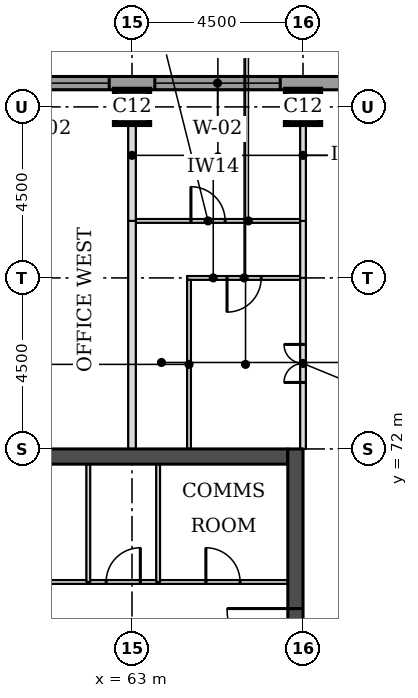
"""IFC4 building model, lengths in metres.
Left out: names, types, materials, properties, quantities, classifications, styles, units other than length and angle.
Written with IfcOpenShell. Run it as: python <this file> out.ifc"""

import sys

from ifc_helpers import new_model, si_unit, direction, frame, frame_2d, origin, origin_2d, place, context, subcontext, project, spatial, rectangle, extrude, element, fill, save


model = new_model("IFC4")
c1 = context("Model", 3, precision=1e-05, world=origin(), true_north=direction((0.0, 1.0)))
c2 = subcontext(c1, "Body", "Model", "MODEL_VIEW")
j1 = project(units=[si_unit("LENGTHUNIT", "METRE"), si_unit("PLANEANGLEUNIT", "RADIAN")], contexts=[c1])
p1 = place(None, origin())
s1 = spatial("IfcSite", under=j1, at=p1, CompositionType="ELEMENT")
p2 = place(p1, origin())
s2 = spatial("IfcBuilding", under=s1, at=p2, CompositionType="ELEMENT")
p3 = place(p2, frame((0.0, 0.0, 166.2)))
s3 = spatial("IfcBuildingStorey", under=s2, at=p3, CompositionType="ELEMENT", Elevation=166.2)
for number, where, z_axis, x_axis in (
    (1, (63.0, 81.0, 0.0), (0.0, 0.0, 1.0), (1.0, 0.0, 0.0)),
    (2, (67.5, 81.0, 0.0), (0.0, 0.0, 1.0), (1.0, 0.0, 0.0)),
):
    element("IfcColumn", number, at=place(p3, frame(where, z_axis=z_axis, x_axis=x_axis)), inside=s3, PredefinedType="COLUMN", context=c2, shape_type="SweptSolid", body=[
        extrude(rectangle(XDim=0.9, YDim=0.9, at=origin_2d()), origin(), (0.0, 0.0, 1.0), 3.7),
    ])
p4 = place(p3, frame((45.4, 71.8, 0.0), z_axis=(0.0, 0.0, 1.0), x_axis=(1.0, 0.0, 0.0)))
e3 = element("IfcWall", 3, at=p4, inside=s3, PredefinedType="SHEAR", context=c2, shape_type="SweptSolid", body=[
    extrude(rectangle(XDim=21.7, YDim=0.4, at=frame_2d((10.85, 0.0))), origin(), (0.0, 0.0, 1.0), 3.7),
])
p5 = place(p3, frame((67.3, 49.5, 0.0), z_axis=(0.0, 0.0, 1.0), x_axis=(0.0, 1.0, 0.0)))
e4 = element("IfcWall", 4, at=p5, inside=s3, PredefinedType="SHEAR", context=c2, shape_type="SweptSolid", body=[
    extrude(rectangle(XDim=22.5, YDim=0.4, at=frame_2d((11.25, 0.0))), origin(), (0.0, 0.0, 1.0), 3.7),
])
p6 = place(p5, frame((4.2, 0.0, 0.0)))
e5 = element("IfcOpeningElement", 5, at=p6, cuts=e4, PredefinedType="OPENING", context=c2, shape_type="SweptSolid", body=[
    extrude(rectangle(XDim=1.8, YDim=2.1, at=frame_2d((0.9, 1.05))), frame((0.0, 0.21, 0.0), z_axis=(0.0, -1.0, 0.0), x_axis=(1.0, 0.0, 0.0)), (0.0, 0.0, 1.0), 0.42),
])
p7 = place(p5, frame((6.9, 0.0, 0.0)))
e6 = element("IfcOpeningElement", 6, at=p7, cuts=e4, PredefinedType="OPENING", context=c2, shape_type="SweptSolid", body=[
    extrude(rectangle(XDim=1.1, YDim=2.1, at=frame_2d((0.55, 1.05))), frame((0.0, 0.21, 0.0), z_axis=(0.0, -1.0, 0.0), x_axis=(1.0, 0.0, 0.0)), (0.0, 0.0, 1.0), 0.42),
])
p8 = place(p5, frame((13.6, 0.0, 0.0)))
e7 = element("IfcOpeningElement", 7, at=p8, cuts=e4, PredefinedType="OPENING", context=c2, shape_type="SweptSolid", body=[
    extrude(rectangle(XDim=1.1, YDim=2.1, at=frame_2d((0.55, 1.05))), frame((0.0, 0.21, 0.0), z_axis=(0.0, -1.0, 0.0), x_axis=(1.0, 0.0, 0.0)), (0.0, 0.0, 1.0), 0.42),
])
p9 = place(p5, frame((16.5, 0.0, 0.0)))
e8 = element("IfcOpeningElement", 8, at=p9, cuts=e4, PredefinedType="OPENING", context=c2, shape_type="SweptSolid", body=[
    extrude(rectangle(XDim=1.8, YDim=2.1, at=frame_2d((0.9, 1.05))), frame((0.0, 0.21, 0.0), z_axis=(0.0, -1.0, 0.0), x_axis=(1.0, 0.0, 0.0)), (0.0, 0.0, 1.0), 0.42),
])
p10 = place(p3, frame((72.331, 81.625, 0.0), z_axis=(0.0, 0.0, 1.0), x_axis=(-1.0, 0.0, 0.0)))
e9 = element("IfcWall", 9, at=p10, inside=s3, PredefinedType="STANDARD", context=c2, shape_type="SweptSolid", body=[
    extrude(rectangle(XDim=32.163, YDim=0.35, at=frame_2d((16.081, 0.0))), origin(), (0.0, 0.0, 1.0), 3.525),
])
p11 = place(p10, frame((5.431, 0.0, 0.9)))
e10 = element("IfcOpeningElement", 10, at=p11, cuts=e9, PredefinedType="OPENING", context=c2, shape_type="SweptSolid", body=[
    extrude(rectangle(XDim=3.3, YDim=1.9, at=frame_2d((1.65, 0.95))), frame((0.0, 0.185, 0.0), z_axis=(0.0, -1.0, 0.0), x_axis=(1.0, 0.0, 0.0)), (0.0, 0.0, 1.0), 0.37),
])
p12 = place(p10, frame((9.931, 0.0, 0.9)))
e11 = element("IfcOpeningElement", 11, at=p12, cuts=e9, PredefinedType="OPENING", context=c2, shape_type="SweptSolid", body=[
    extrude(rectangle(XDim=3.3, YDim=1.9, at=frame_2d((1.65, 0.95))), frame((0.0, 0.185, 0.0), z_axis=(0.0, -1.0, 0.0), x_axis=(1.0, 0.0, 0.0)), (0.0, 0.0, 1.0), 0.37),
])
p13 = place(p10, frame((14.431, 0.0, 0.9)))
e12 = element("IfcOpeningElement", 12, at=p13, cuts=e9, PredefinedType="OPENING", context=c2, shape_type="SweptSolid", body=[
    extrude(rectangle(XDim=3.3, YDim=1.9, at=frame_2d((1.65, 0.95))), frame((0.0, 0.185, 0.0), z_axis=(0.0, -1.0, 0.0), x_axis=(1.0, 0.0, 0.0)), (0.0, 0.0, 1.0), 0.37),
])
p14 = place(p10, frame((18.931, 0.0, 0.9)))
e13 = element("IfcOpeningElement", 13, at=p14, cuts=e9, PredefinedType="OPENING", context=c2, shape_type="SweptSolid", body=[
    extrude(rectangle(XDim=3.3, YDim=1.9, at=frame_2d((1.65, 0.95))), frame((0.0, 0.185, 0.0), z_axis=(0.0, -1.0, 0.0), x_axis=(1.0, 0.0, 0.0)), (0.0, 0.0, 1.0), 0.37),
])
p15 = place(p10, frame((23.431, 0.0, 0.9)))
e14 = element("IfcOpeningElement", 14, at=p15, cuts=e9, PredefinedType="OPENING", context=c2, shape_type="SweptSolid", body=[
    extrude(rectangle(XDim=3.3, YDim=1.9, at=frame_2d((1.65, 0.95))), frame((0.0, 0.185, 0.0), z_axis=(0.0, -1.0, 0.0), x_axis=(1.0, 0.0, 0.0)), (0.0, 0.0, 1.0), 0.37),
])
p16 = place(p3, frame((64.45, 76.5, 0.0), z_axis=(0.0, 0.0, 1.0), x_axis=(1.0, 0.0, 0.0)))
e15 = element("IfcWall", 15, at=p16, inside=s3, PredefinedType="PARTITIONING", context=c2, shape_type="SweptSolid", body=[
    extrude(rectangle(XDim=2.975, YDim=0.1, at=frame_2d((1.488, 0.0))), origin(), (0.0, 0.0, 1.0), 3.55),
])
p17 = place(p16, frame((1.05, 0.0, 0.0)))
e16 = element("IfcOpeningElement", 16, at=p17, cuts=e15, PredefinedType="OPENING", context=c2, shape_type="SweptSolid", body=[
    extrude(rectangle(XDim=0.9, YDim=2.1, at=frame_2d((0.45, 1.05))), frame((0.0, 0.06, 0.0), z_axis=(0.0, -1.0, 0.0), x_axis=(1.0, 0.0, 0.0)), (0.0, 0.0, 1.0), 0.12),
])
p18 = place(p3, frame((63.1, 78.0, 0.0), z_axis=(0.0, 0.0, 1.0), x_axis=(1.0, 0.0, 0.0)))
e17 = element("IfcWall", 17, at=p18, inside=s3, PredefinedType="PARTITIONING", context=c2, shape_type="SweptSolid", body=[
    extrude(rectangle(XDim=4.325, YDim=0.1, at=frame_2d((2.163, 0.0))), origin(), (0.0, 0.0, 1.0), 3.55),
])
p19 = place(p18, frame((1.45, 0.0, 0.0)))
e18 = element("IfcOpeningElement", 18, at=p19, cuts=e17, PredefinedType="OPENING", context=c2, shape_type="SweptSolid", body=[
    extrude(rectangle(XDim=0.9, YDim=2.1, at=frame_2d((0.45, 1.05))), frame((0.0, 0.06, 0.0), z_axis=(0.0, -1.0, 0.0), x_axis=(1.0, 0.0, 0.0)), (0.0, 0.0, 1.0), 0.12),
])
p20 = place(p3, frame((63.0, 72.0, 0.0), z_axis=(0.0, 0.0, 1.0), x_axis=(0.0, 1.0, 0.0)))
e19 = element("IfcWall", 19, at=p20, inside=s3, PredefinedType="PARTITIONING", context=c2, shape_type="SweptSolid", body=[
    extrude(rectangle(XDim=6.0, YDim=0.2, at=frame_2d((3.0, 0.0))), origin(), (0.0, 0.0, 1.0), 3.55),
])
p21 = place(p3, frame((64.5, 72.0, 0.0), z_axis=(0.0, 0.0, 1.0), x_axis=(0.0, 1.0, 0.0)))
e20 = element("IfcWall", 20, at=p21, inside=s3, PredefinedType="PARTITIONING", context=c2, shape_type="SweptSolid", body=[
    extrude(rectangle(XDim=4.45, YDim=0.1, at=frame_2d((2.225, 0.0))), origin(), (0.0, 0.0, 1.0), 3.55),
])
p22 = place(p3, frame((67.5, 72.0, 0.0), z_axis=(0.0, 0.0, 1.0), x_axis=(0.0, 1.0, 0.0)))
e21 = element("IfcWall", 21, at=p22, inside=s3, PredefinedType="PARTITIONING", context=c2, shape_type="SweptSolid", body=[
    extrude(rectangle(XDim=4.5, YDim=0.15, at=frame_2d((2.25, 0.0))), origin(), (0.0, 0.0, 1.0), 3.022),
])
p23 = place(p22, frame((1.75, 0.0, 0.0)))
e22 = element("IfcOpeningElement", 22, at=p23, cuts=e21, PredefinedType="OPENING", context=c2, shape_type="SweptSolid", body=[
    extrude(rectangle(XDim=1.0, YDim=2.1, at=frame_2d((0.5, 1.05))), frame((0.0, 0.085, 0.0), z_axis=(0.0, -1.0, 0.0), x_axis=(1.0, 0.0, 0.0)), (0.0, 0.0, 1.0), 0.17),
])
p24 = place(p3, frame((67.5, 76.5, 0.0), z_axis=(0.0, 0.0, 1.0), x_axis=(0.0, 1.0, 0.0)))
e23 = element("IfcWall", 23, at=p24, inside=s3, PredefinedType="PARTITIONING", context=c2, shape_type="SweptSolid", body=[
    extrude(rectangle(XDim=1.5, YDim=0.15, at=frame_2d((0.75, 0.0))), origin(), (0.0, 0.0, 1.0), 3.022),
])
p25 = place(p3, frame((63.0, 78.0, 0.0), z_axis=(0.0, 0.0, 1.0), x_axis=(0.0, 1.0, 0.0)))
e24 = element("IfcWall", 24, at=p25, inside=s3, PredefinedType="PARTITIONING", context=c2, shape_type="SweptSolid", body=[
    extrude(rectangle(XDim=3.45, YDim=0.2, at=frame_2d((1.725, 0.0))), origin(), (0.0, 0.0, 1.0), 3.55),
])
p26 = place(p3, frame((67.5, 78.0, 0.0), z_axis=(0.0, 0.0, 1.0), x_axis=(0.0, 1.0, 0.0)))
e25 = element("IfcWall", 25, at=p26, inside=s3, PredefinedType="PARTITIONING", context=c2, shape_type="SweptSolid", body=[
    extrude(rectangle(XDim=3.45, YDim=0.15, at=frame_2d((1.725, 0.0))), origin(), (0.0, 0.0, 1.0), 3.022),
])
p27 = place(p3, frame((45.4, 68.5, 0.0), z_axis=(0.0, 0.0, 1.0), x_axis=(1.0, 0.0, 0.0)))
e26 = element("IfcWall", 26, at=p27, inside=s3, PredefinedType="PARTITIONING", context=c2, shape_type="SweptSolid", body=[
    extrude(rectangle(XDim=21.7, YDim=0.1, at=frame_2d((10.85, 0.0))), origin(), (0.0, 0.0, 1.0), 3.55),
])
p28 = place(p27, frame((19.544, 0.0, 0.0)))
e27 = element("IfcOpeningElement", 27, at=p28, cuts=e26, PredefinedType="OPENING", context=c2, shape_type="SweptSolid", body=[
    extrude(rectangle(XDim=0.9, YDim=2.1, at=frame_2d((0.45, 1.05))), frame((0.0, 0.06, 0.0), z_axis=(0.0, -1.0, 0.0), x_axis=(1.0, 0.0, 0.0)), (0.0, 0.0, 1.0), 0.12),
])
p29 = place(p27, frame((16.919, 0.0, 0.0)))
e28 = element("IfcOpeningElement", 28, at=p29, cuts=e26, PredefinedType="OPENING", context=c2, shape_type="SweptSolid", body=[
    extrude(rectangle(XDim=0.9, YDim=2.1, at=frame_2d((0.45, 1.05))), frame((0.0, 0.06, 0.0), z_axis=(0.0, -1.0, 0.0), x_axis=(1.0, 0.0, 0.0)), (0.0, 0.0, 1.0), 0.12),
])
p30 = place(p27, frame((0.6, 0.0, 0.0)))
e29 = element("IfcOpeningElement", 29, at=p30, cuts=e26, PredefinedType="OPENING", context=c2, shape_type="SweptSolid", body=[
    extrude(rectangle(XDim=0.9, YDim=2.1, at=frame_2d((0.45, 1.05))), frame((0.0, 0.06, 0.0), z_axis=(0.0, -1.0, 0.0), x_axis=(1.0, 0.0, 0.0)), (0.0, 0.0, 1.0), 0.12),
])
p31 = place(p27, frame((3.225, 0.0, 0.0)))
e30 = element("IfcOpeningElement", 30, at=p31, cuts=e26, PredefinedType="OPENING", context=c2, shape_type="SweptSolid", body=[
    extrude(rectangle(XDim=0.9, YDim=2.1, at=frame_2d((0.45, 1.05))), frame((0.0, 0.06, 0.0), z_axis=(0.0, -1.0, 0.0), x_axis=(1.0, 0.0, 0.0)), (0.0, 0.0, 1.0), 0.12),
])
p32 = place(p27, frame((14.208, 0.0, 0.0)))
e31 = element("IfcOpeningElement", 31, at=p32, cuts=e26, PredefinedType="OPENING", context=c2, shape_type="SweptSolid", body=[
    extrude(rectangle(XDim=0.9, YDim=2.1, at=frame_2d((0.45, 1.05))), frame((0.0, 0.06, 0.0), z_axis=(0.0, -1.0, 0.0), x_axis=(1.0, 0.0, 0.0)), (0.0, 0.0, 1.0), 0.12),
])
p33 = place(p27, frame((10.96, 0.0, 0.0)))
e32 = element("IfcOpeningElement", 32, at=p33, cuts=e26, PredefinedType="OPENING", context=c2, shape_type="SweptSolid", body=[
    extrude(rectangle(XDim=0.9, YDim=2.1, at=frame_2d((0.45, 1.05))), frame((0.0, 0.06, 0.0), z_axis=(0.0, -1.0, 0.0), x_axis=(1.0, 0.0, 0.0)), (0.0, 0.0, 1.0), 0.12),
])
p34 = place(p27, frame((8.272, 0.0, 0.0)))
e33 = element("IfcOpeningElement", 33, at=p34, cuts=e26, PredefinedType="OPENING", context=c2, shape_type="SweptSolid", body=[
    extrude(rectangle(XDim=0.9, YDim=2.1, at=frame_2d((0.45, 1.05))), frame((0.0, 0.06, 0.0), z_axis=(0.0, -1.0, 0.0), x_axis=(1.0, 0.0, 0.0)), (0.0, 0.0, 1.0), 0.12),
])
p35 = place(p27, frame((5.92, 0.0, 0.0)))
e34 = element("IfcOpeningElement", 34, at=p35, cuts=e26, PredefinedType="OPENING", context=c2, shape_type="SweptSolid", body=[
    extrude(rectangle(XDim=0.9, YDim=2.1, at=frame_2d((0.45, 1.05))), frame((0.0, 0.06, 0.0), z_axis=(0.0, -1.0, 0.0), x_axis=(1.0, 0.0, 0.0)), (0.0, 0.0, 1.0), 0.12),
])
for number, where, z_axis, x_axis in (
    (35, (61.85, 68.5, 0.0), (0.0, 0.0, 1.0), (0.0, 1.0, 0.0)),
    (36, (63.688, 68.5, 0.0), (0.0, 0.0, 1.0), (0.0, 1.0, 0.0)),
):
    element("IfcWall", number, at=place(p3, frame(where, z_axis=z_axis, x_axis=x_axis)), inside=s3, PredefinedType="PARTITIONING", context=c2, shape_type="SweptSolid", body=[
        extrude(rectangle(XDim=3.1, YDim=0.1, at=frame_2d((1.55, 0.0))), origin(), (0.0, 0.0, 1.0), 3.55),
    ])
p36 = place(p11, origin())
e37 = element("IfcWindow", 37, at=p36, inside=s3, PartitioningType="SINGLE_PANEL", PredefinedType="WINDOW", context=c2, shape_type="SweptSolid", body=[
    extrude(rectangle(XDim=3.3, YDim=1.9, at=frame_2d((1.65, 0.95))), frame((0.0, 0.085, 0.0), z_axis=(0.0, -1.0, 0.0), x_axis=(1.0, 0.0, 0.0)), (0.0, 0.0, 1.0), 0.06),
])
fill(e10, e37)
p37 = place(p12, origin())
e38 = element("IfcWindow", 38, at=p37, inside=s3, PartitioningType="SINGLE_PANEL", PredefinedType="WINDOW", context=c2, shape_type="SweptSolid", body=[
    extrude(rectangle(XDim=3.3, YDim=1.9, at=frame_2d((1.65, 0.95))), frame((0.0, 0.085, 0.0), z_axis=(0.0, -1.0, 0.0), x_axis=(1.0, 0.0, 0.0)), (0.0, 0.0, 1.0), 0.06),
])
fill(e11, e38)
p38 = place(p23, origin())
e39 = element("IfcDoor", 39, at=p38, inside=s3, OperationType="DOUBLE_DOOR_SINGLE_SWING", PredefinedType="DOOR", context=c2, shape_type="SweptSolid", body=[
    extrude(rectangle(XDim=1.0, YDim=2.1, at=frame_2d((0.5, 1.05))), frame((0.0, 0.025, 0.0), z_axis=(0.0, -1.0, 0.0), x_axis=(1.0, 0.0, 0.0)), (0.0, 0.0, 1.0), 0.05),
])
fill(e22, e39)
p39 = place(p17, frame((0.9, 0.0, 0.0), z_axis=(0.0, 0.0, 1.0), x_axis=(-1.0, 0.0, 0.0)))
e40 = element("IfcDoor", 40, at=p39, inside=s3, OperationType="SINGLE_SWING_RIGHT", PredefinedType="DOOR", context=c2, shape_type="SweptSolid", body=[
    extrude(rectangle(XDim=0.9, YDim=2.1, at=frame_2d((0.45, 1.05))), frame((0.0, 0.025, 0.0), z_axis=(0.0, -1.0, 0.0), x_axis=(1.0, 0.0, 0.0)), (0.0, 0.0, 1.0), 0.05),
])
fill(e16, e40)
p40 = place(p19, origin())
e41 = element("IfcDoor", 41, at=p40, inside=s3, OperationType="SINGLE_SWING_LEFT", PredefinedType="DOOR", context=c2, shape_type="SweptSolid", body=[
    extrude(rectangle(XDim=0.9, YDim=2.1, at=frame_2d((0.45, 1.05))), frame((0.0, 0.025, 0.0), z_axis=(0.0, -1.0, 0.0), x_axis=(1.0, 0.0, 0.0)), (0.0, 0.0, 1.0), 0.05),
])
fill(e18, e41)
p41 = place(p9, origin())
e42 = element("IfcDoor", 42, at=p41, inside=s3, OperationType="SINGLE_SWING_RIGHT", PredefinedType="DOOR", context=c2, shape_type="SweptSolid", body=[
    extrude(rectangle(XDim=1.8, YDim=2.1, at=frame_2d((0.9, 1.05))), frame((0.0, 0.025, 0.0), z_axis=(0.0, -1.0, 0.0), x_axis=(1.0, 0.0, 0.0)), (0.0, 0.0, 1.0), 0.05),
])
fill(e8, e42)
p42 = place(p28, origin())
e43 = element("IfcDoor", 43, at=p42, inside=s3, OperationType="SINGLE_SWING_LEFT", PredefinedType="DOOR", context=c2, shape_type="SweptSolid", body=[
    extrude(rectangle(XDim=0.9, YDim=2.1, at=frame_2d((0.45, 1.05))), frame((0.0, 0.025, 0.0), z_axis=(0.0, -1.0, 0.0), x_axis=(1.0, 0.0, 0.0)), (0.0, 0.0, 1.0), 0.05),
])
fill(e27, e43)
p43 = place(p29, origin())
e44 = element("IfcDoor", 44, at=p43, inside=s3, OperationType="SINGLE_SWING_RIGHT", PredefinedType="DOOR", context=c2, shape_type="SweptSolid", body=[
    extrude(rectangle(XDim=0.9, YDim=2.1, at=frame_2d((0.45, 1.05))), frame((0.0, 0.025, 0.0), z_axis=(0.0, -1.0, 0.0), x_axis=(1.0, 0.0, 0.0)), (0.0, 0.0, 1.0), 0.05),
])
fill(e28, e44)
save(model, sys.argv[1])
